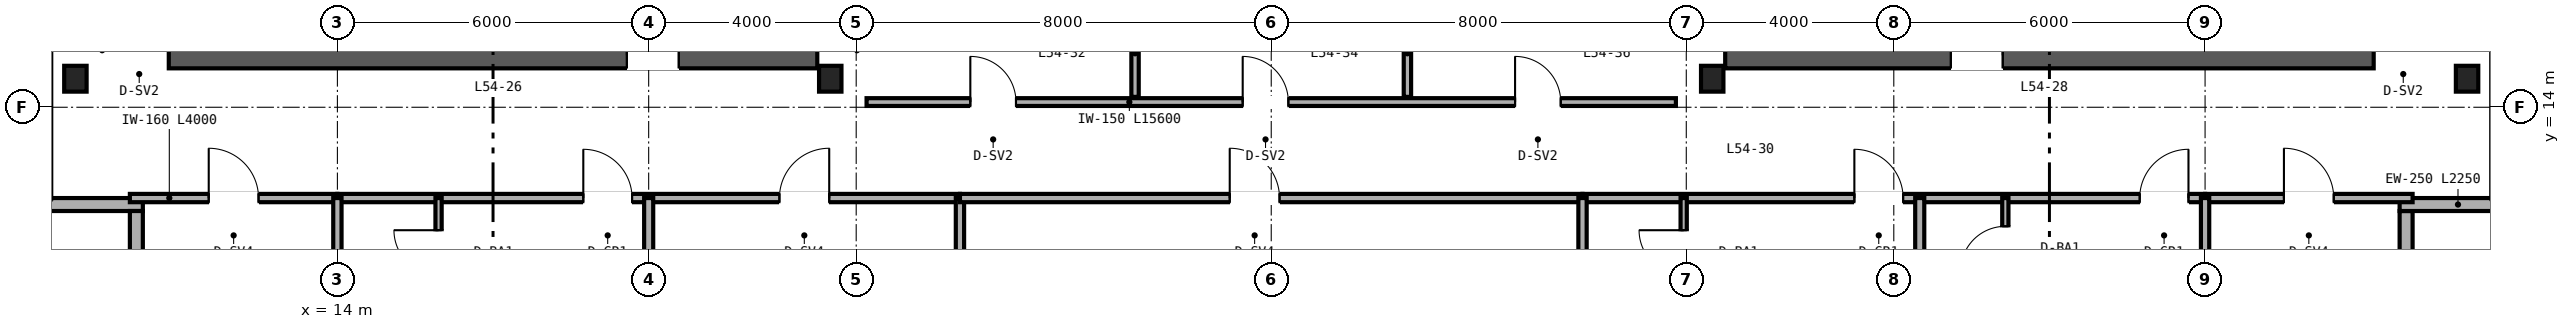
"""IFC4 building model, lengths in metres.
Left out: names, types, materials, properties, quantities, classifications, styles, units other than length and angle.
Written with IfcOpenShell. Run it as: python <this file> out.ifc"""

import sys

from ifc_helpers import new_model, si_unit, direction, frame, frame_2d, origin, origin_2d, place, context, subcontext, project, spatial, rectangle, i_section, extrude, source, transform, mapped, element, fill, save


model = new_model("IFC4")
c1 = context("Model", 3, precision=1e-05, world=origin(), true_north=direction((0.0, 1.0)))
c2 = subcontext(c1, "Body", "Model", "MODEL_VIEW")
j1 = project(units=[si_unit("LENGTHUNIT", "METRE"), si_unit("PLANEANGLEUNIT", "RADIAN")], contexts=[c1])
p1 = place(None, origin())
s1 = spatial("IfcSite", under=j1, at=p1, CompositionType="ELEMENT")
p2 = place(p1, origin())
s2 = spatial("IfcBuilding", under=s1, at=p2, CompositionType="ELEMENT")
p3 = place(p2, frame((0.0, 0.0, 213.6)))
s3 = spatial("IfcBuildingStorey", under=s2, at=p3, CompositionType="ELEMENT", Elevation=213.6)
p4 = place(p3, frame((10.75, 15.0, 0.0), z_axis=(0.0, 0.0, 1.0), x_axis=(1.0, 0.0, 0.0)))
e1 = element("IfcWall", 1, at=p4, inside=s3, PredefinedType="SHEAR", context=c2, shape_type="SweptSolid", body=[
    extrude(rectangle(XDim=12.5, YDim=0.5, at=frame_2d((6.25, 0.0))), origin(), (0.0, 0.0, 1.0), 3.37),
])
p5 = place(p4, frame((8.83, 0.0, 0.0)))
e2 = element("IfcOpeningElement", 2, at=p5, cuts=e1, PredefinedType="OPENING", context=c2, shape_type="SweptSolid", body=[
    extrude(rectangle(XDim=1.0, YDim=2.15, at=frame_2d((0.5, 1.075))), frame((0.0, 0.26, 0.0), z_axis=(0.0, -1.0, 0.0), x_axis=(1.0, 0.0, 0.0)), (0.0, 0.0, 1.0), 0.52),
])
p6 = place(p3, frame((40.75, 15.0, 0.0), z_axis=(0.0, 0.0, 1.0), x_axis=(1.0, 0.0, 0.0)))
e3 = element("IfcWall", 3, at=p6, inside=s3, PredefinedType="SHEAR", context=c2, shape_type="SweptSolid", body=[
    extrude(rectangle(XDim=12.5, YDim=0.5, at=frame_2d((6.25, 0.0))), origin(), (0.0, 0.0, 1.0), 3.37),
])
p7 = place(p6, frame((4.35, 0.0, 0.0)))
e4 = element("IfcOpeningElement", 4, at=p7, cuts=e3, PredefinedType="OPENING", context=c2, shape_type="SweptSolid", body=[
    extrude(rectangle(XDim=1.0, YDim=2.15, at=frame_2d((0.5, 1.075))), frame((0.0, 0.26, 0.0), z_axis=(0.0, -1.0, 0.0), x_axis=(1.0, 0.0, 0.0)), (0.0, 0.0, 1.0), 0.52),
])
m1 = source(origin(), c2, "Body", "SweptSolid", [
    extrude(i_section(OverallWidth=0.432, OverallDepth=0.498, WebThickness=0.056, FlangeThickness=0.089, FilletRadius=0.025, at=origin_2d()), origin(), (0.0, 0.0, 1.0), 3.37),
])
for number, where, z_axis, x_axis in (
    (5, (8.95, 14.55, 0.0), (0.0, 0.0, 1.0), (1.0, 0.0, 0.0)),
    (6, (23.5, 14.55, 0.0), (0.0, 0.0, 1.0), (1.0, 0.0, 0.0)),
    (7, (40.5, 14.55, 0.0), (0.0, 0.0, 1.0), (1.0, 0.0, 0.0)),
    (8, (55.05, 14.55, 0.0), (0.0, 0.0, 1.0), (1.0, 0.0, 0.0)),
):
    element("IfcColumn", number, at=place(p3, frame(where, z_axis=z_axis, x_axis=x_axis)), inside=s3, PredefinedType="COLUMN", context=c2, shape_type="MappedRepresentation", body=[
        mapped(m1, transform((0.0, 0.0, 0.0), scale=1.0)),
    ])
p8 = place(p3, frame((53.875, 10.0, 0.0), z_axis=(0.0, 0.0, 1.0), x_axis=(0.0, 1.0, 0.0)))
e9 = element("IfcWall", 9, at=p8, inside=s3, PredefinedType="SOLIDWALL", context=c2, shape_type="SweptSolid", body=[
    extrude(rectangle(XDim=2.0, YDim=0.25, at=frame_2d((1.0, 0.0))), origin(), (0.0, 0.0, 1.0), 3.37),
])
for number, where, z_axis, x_axis in (
    (10, (53.75, 12.125, 0.0), (0.0, 0.0, 1.0), (1.0, 0.0, 0.0)),
    (11, (8.0, 12.125, 0.0), (0.0, 0.0, 1.0), (1.0, 0.0, 0.0)),
):
    element("IfcWall", number, at=place(p3, frame(where, z_axis=z_axis, x_axis=x_axis)), inside=s3, PredefinedType="SOLIDWALL", context=c2, shape_type="SweptSolid", body=[
        extrude(rectangle(XDim=2.25, YDim=0.25, at=frame_2d((1.125, 0.0))), origin(), (0.0, 0.0, 1.0), 3.37),
    ])
p9 = place(p3, frame((10.125, 12.0, 0.0), z_axis=(0.0, 0.0, 1.0), x_axis=(0.0, -1.0, 0.0)))
e12 = element("IfcWall", 12, at=p9, inside=s3, PredefinedType="SOLIDWALL", context=c2, shape_type="SweptSolid", body=[
    extrude(rectangle(XDim=2.0, YDim=0.25, at=frame_2d((1.0, 0.0))), origin(), (0.0, 0.0, 1.0), 3.37),
])
p10 = place(p3, frame((24.2, 14.1, 0.0), z_axis=(0.0, 0.0, 1.0), x_axis=(1.0, 0.0, 0.0)))
e13 = element("IfcWall", 13, at=p10, inside=s3, PredefinedType="PARTITIONING", context=c2, shape_type="SweptSolid", body=[
    extrude(rectangle(XDim=15.6, YDim=0.15, at=frame_2d((7.8, 0.0))), origin(), (0.0, 0.0, 1.0), 3.37),
])
p11 = place(p10, frame((2.0, 0.0, 0.0)))
e14 = element("IfcOpeningElement", 14, at=p11, cuts=e13, PredefinedType="OPENING", context=c2, shape_type="SweptSolid", body=[
    extrude(rectangle(XDim=0.88, YDim=2.15, at=frame_2d((0.44, 1.075))), frame((0.0, 0.085, 0.0), z_axis=(0.0, -1.0, 0.0), x_axis=(1.0, 0.0, 0.0)), (0.0, 0.0, 1.0), 0.17),
])
p12 = place(p10, frame((7.25, 0.0, 0.0)))
e15 = element("IfcOpeningElement", 15, at=p12, cuts=e13, PredefinedType="OPENING", context=c2, shape_type="SweptSolid", body=[
    extrude(rectangle(XDim=0.88, YDim=2.15, at=frame_2d((0.44, 1.075))), frame((0.0, 0.085, 0.0), z_axis=(0.0, -1.0, 0.0), x_axis=(1.0, 0.0, 0.0)), (0.0, 0.0, 1.0), 0.17),
])
p13 = place(p10, frame((12.5, 0.0, 0.0)))
e16 = element("IfcOpeningElement", 16, at=p13, cuts=e13, PredefinedType="OPENING", context=c2, shape_type="SweptSolid", body=[
    extrude(rectangle(XDim=0.88, YDim=2.15, at=frame_2d((0.44, 1.075))), frame((0.0, 0.085, 0.0), z_axis=(0.0, -1.0, 0.0), x_axis=(1.0, 0.0, 0.0)), (0.0, 0.0, 1.0), 0.17),
])
for number, where, z_axis, x_axis in (
    (17, (29.375, 14.2, 0.0), (0.0, 0.0, 1.0), (0.0, 1.0, 0.0)),
    (18, (34.625, 14.2, 0.0), (0.0, 0.0, 1.0), (0.0, 1.0, 0.0)),
):
    element("IfcWall", number, at=place(p3, frame(where, z_axis=z_axis, x_axis=x_axis)), inside=s3, PredefinedType="PARTITIONING", context=c2, shape_type="SweptSolid", body=[
        extrude(rectangle(XDim=1.68, YDim=0.142, at=frame_2d((0.84, 0.0))), origin(), (0.0, 0.0, 1.0), 3.37),
    ])
p14 = place(p3, frame((10.0, 12.25, 0.0), z_axis=(0.0, 0.0, 1.0), x_axis=(1.0, 0.0, 0.0)))
e19 = element("IfcWall", 19, at=p14, inside=s3, PredefinedType="PARTITIONING", context=c2, shape_type="SweptSolid", body=[
    extrude(rectangle(XDim=4.0, YDim=0.16, at=frame_2d((2.0, 0.0))), origin(), (0.0, 0.0, 1.0), 3.37),
])
p15 = place(p14, frame((1.52, 0.0, 0.0)))
e20 = element("IfcOpeningElement", 20, at=p15, cuts=e19, PredefinedType="OPENING", context=c2, shape_type="SweptSolid", body=[
    extrude(rectangle(XDim=0.96, YDim=2.15, at=frame_2d((0.48, 1.075))), frame((0.0, 0.09, 0.0), z_axis=(0.0, -1.0, 0.0), x_axis=(1.0, 0.0, 0.0)), (0.0, 0.0, 1.0), 0.18),
])
p16 = place(p3, frame((50.0, 12.25, 0.0), z_axis=(0.0, 0.0, 1.0), x_axis=(1.0, 0.0, 0.0)))
e21 = element("IfcWall", 21, at=p16, inside=s3, PredefinedType="PARTITIONING", context=c2, shape_type="SweptSolid", body=[
    extrude(rectangle(XDim=4.0, YDim=0.16, at=frame_2d((2.0, 0.0))), origin(), (0.0, 0.0, 1.0), 3.37),
])
p17 = place(p16, frame((1.52, 0.0, 0.0)))
e22 = element("IfcOpeningElement", 22, at=p17, cuts=e21, PredefinedType="OPENING", context=c2, shape_type="SweptSolid", body=[
    extrude(rectangle(XDim=0.96, YDim=2.15, at=frame_2d((0.48, 1.075))), frame((0.0, 0.09, 0.0), z_axis=(0.0, -1.0, 0.0), x_axis=(1.0, 0.0, 0.0)), (0.0, 0.0, 1.0), 0.18),
])
p18 = place(p3, frame((14.0, 12.25, 0.0), z_axis=(0.0, 0.0, 1.0), x_axis=(1.0, 0.0, 0.0)))
e23 = element("IfcWall", 23, at=p18, inside=s3, PredefinedType="PARTITIONING", context=c2, shape_type="SweptSolid", body=[
    extrude(rectangle(XDim=12.0, YDim=0.16, at=frame_2d((6.0, 0.0))), origin(), (0.0, 0.0, 1.0), 2.913),
])
p19 = place(p18, frame((4.74, 0.0, 0.0)))
e24 = element("IfcOpeningElement", 24, at=p19, cuts=e23, PredefinedType="OPENING", context=c2, shape_type="SweptSolid", body=[
    extrude(rectangle(XDim=0.94, YDim=2.15, at=frame_2d((0.47, 1.075))), frame((0.0, 0.09, 0.0), z_axis=(0.0, -1.0, 0.0), x_axis=(1.0, 0.0, 0.0)), (0.0, 0.0, 1.0), 0.18),
])
p20 = place(p18, frame((8.52, 0.0, 0.0)))
e25 = element("IfcOpeningElement", 25, at=p20, cuts=e23, PredefinedType="OPENING", context=c2, shape_type="SweptSolid", body=[
    extrude(rectangle(XDim=0.96, YDim=2.15, at=frame_2d((0.48, 1.075))), frame((0.0, 0.09, 0.0), z_axis=(0.0, -1.0, 0.0), x_axis=(1.0, 0.0, 0.0)), (0.0, 0.0, 1.0), 0.18),
])
p21 = place(p3, frame((14.0, 6.36, 0.0), z_axis=(0.0, 0.0, 1.0), x_axis=(0.0, 1.0, 0.0)))
e26 = element("IfcWall", 26, at=p21, inside=s3, PredefinedType="PARTITIONING", context=c2, shape_type="SweptSolid", body=[
    extrude(rectangle(XDim=5.89, YDim=0.16, at=frame_2d((2.945, 0.0))), origin(), (0.0, 0.0, 1.0), 2.677),
])
p22 = place(p3, frame((26.0, 6.36, 0.0), z_axis=(0.0, 0.0, 1.0), x_axis=(0.0, 1.0, 0.0)))
e27 = element("IfcWall", 27, at=p22, inside=s3, PredefinedType="PARTITIONING", context=c2, shape_type="SweptSolid", body=[
    extrude(rectangle(XDim=5.89, YDim=0.16, at=frame_2d((2.945, 0.0))), origin(), (0.0, 0.0, 1.0), 2.443),
])
p23 = place(p3, frame((20.0, 6.36, 0.0), z_axis=(0.0, 0.0, 1.0), x_axis=(0.0, 1.0, 0.0)))
e28 = element("IfcWall", 28, at=p23, inside=s3, PredefinedType="PARTITIONING", context=c2, shape_type="SweptSolid", body=[
    extrude(rectangle(XDim=5.89, YDim=0.175, at=frame_2d((2.945, 0.0))), origin(), (0.0, 0.0, 1.0), 2.677),
])
p24 = place(p3, frame((15.95, 10.15, 0.0), z_axis=(0.0, 0.0, 1.0), x_axis=(0.0, 1.0, 0.0)))
e29 = element("IfcWall", 29, at=p24, inside=s3, PredefinedType="PARTITIONING", context=c2, shape_type="SweptSolid", body=[
    extrude(rectangle(XDim=2.1, YDim=0.12, at=frame_2d((1.05, 0.0))), origin(), (0.0, 0.0, 1.0), 3.37),
])
p25 = place(p24, frame((0.62, 0.0, 0.0)))
e30 = element("IfcOpeningElement", 30, at=p25, cuts=e29, PredefinedType="OPENING", context=c2, shape_type="SweptSolid", body=[
    extrude(rectangle(XDim=0.86, YDim=2.1, at=frame_2d((0.43, 1.05))), frame((0.0, 0.07, 0.0), z_axis=(0.0, -1.0, 0.0), x_axis=(1.0, 0.0, 0.0)), (0.0, 0.0, 1.0), 0.14),
])
p26 = place(p3, frame((26.0, 12.25, 0.0), z_axis=(0.0, 0.0, 1.0), x_axis=(1.0, 0.0, 0.0)))
e31 = element("IfcWall", 31, at=p26, inside=s3, PredefinedType="PARTITIONING", context=c2, shape_type="SweptSolid", body=[
    extrude(rectangle(XDim=12.0, YDim=0.16, at=frame_2d((6.0, 0.0))), origin(), (0.0, 0.0, 1.0), 3.37),
])
p27 = place(p26, frame((5.2, 0.0, 0.0)))
e32 = element("IfcOpeningElement", 32, at=p27, cuts=e31, PredefinedType="OPENING", context=c2, shape_type="SweptSolid", body=[
    extrude(rectangle(XDim=0.96, YDim=2.15, at=frame_2d((0.48, 1.075))), frame((0.0, 0.09, 0.0), z_axis=(0.0, -1.0, 0.0), x_axis=(1.0, 0.0, 0.0)), (0.0, 0.0, 1.0), 0.18),
])
p28 = place(p3, frame((38.0, 12.25, 0.0), z_axis=(0.0, 0.0, 1.0), x_axis=(1.0, 0.0, 0.0)))
e33 = element("IfcWall", 33, at=p28, inside=s3, PredefinedType="PARTITIONING", context=c2, shape_type="SweptSolid", body=[
    extrude(rectangle(XDim=12.0, YDim=0.16, at=frame_2d((6.0, 0.0))), origin(), (0.0, 0.0, 1.0), 2.913),
])
p29 = place(p28, frame((5.24, 0.0, 0.0)))
e34 = element("IfcOpeningElement", 34, at=p29, cuts=e33, PredefinedType="OPENING", context=c2, shape_type="SweptSolid", body=[
    extrude(rectangle(XDim=0.94, YDim=2.15, at=frame_2d((0.47, 1.075))), frame((0.0, 0.09, 0.0), z_axis=(0.0, -1.0, 0.0), x_axis=(1.0, 0.0, 0.0)), (0.0, 0.0, 1.0), 0.18),
])
p30 = place(p28, frame((10.74, 0.0, 0.0)))
e35 = element("IfcOpeningElement", 35, at=p30, cuts=e33, PredefinedType="OPENING", context=c2, shape_type="SweptSolid", body=[
    extrude(rectangle(XDim=0.94, YDim=2.15, at=frame_2d((0.47, 1.075))), frame((0.0, 0.09, 0.0), z_axis=(0.0, -1.0, 0.0), x_axis=(1.0, 0.0, 0.0)), (0.0, 0.0, 1.0), 0.18),
])
p31 = place(p3, frame((38.0, 6.36, 0.0), z_axis=(0.0, 0.0, 1.0), x_axis=(0.0, 1.0, 0.0)))
e36 = element("IfcWall", 36, at=p31, inside=s3, PredefinedType="PARTITIONING", context=c2, shape_type="SweptSolid", body=[
    extrude(rectangle(XDim=5.89, YDim=0.16, at=frame_2d((2.945, 0.0))), origin(), (0.0, 0.0, 1.0), 2.443),
])
p32 = place(p3, frame((50.0, 6.36, 0.0), z_axis=(0.0, 0.0, 1.0), x_axis=(0.0, 1.0, 0.0)))
e37 = element("IfcWall", 37, at=p32, inside=s3, PredefinedType="PARTITIONING", context=c2, shape_type="SweptSolid", body=[
    extrude(rectangle(XDim=5.89, YDim=0.16, at=frame_2d((2.945, 0.0))), origin(), (0.0, 0.0, 1.0), 2.677),
])
p33 = place(p3, frame((44.5, 6.36, 0.0), z_axis=(0.0, 0.0, 1.0), x_axis=(0.0, 1.0, 0.0)))
e38 = element("IfcWall", 38, at=p33, inside=s3, PredefinedType="PARTITIONING", context=c2, shape_type="SweptSolid", body=[
    extrude(rectangle(XDim=5.89, YDim=0.175, at=frame_2d((2.945, 0.0))), origin(), (0.0, 0.0, 1.0), 2.677),
])
p34 = place(p3, frame((39.95, 10.15, 0.0), z_axis=(0.0, 0.0, 1.0), x_axis=(0.0, 1.0, 0.0)))
e39 = element("IfcWall", 39, at=p34, inside=s3, PredefinedType="PARTITIONING", context=c2, shape_type="SweptSolid", body=[
    extrude(rectangle(XDim=2.1, YDim=0.12, at=frame_2d((1.05, 0.0))), origin(), (0.0, 0.0, 1.0), 3.37),
])
p35 = place(p34, frame((0.62, 0.0, 0.0)))
e40 = element("IfcOpeningElement", 40, at=p35, cuts=e39, PredefinedType="OPENING", context=c2, shape_type="SweptSolid", body=[
    extrude(rectangle(XDim=0.86, YDim=2.1, at=frame_2d((0.43, 1.05))), frame((0.0, 0.07, 0.0), z_axis=(0.0, -1.0, 0.0), x_axis=(1.0, 0.0, 0.0)), (0.0, 0.0, 1.0), 0.14),
])
p36 = place(p3, frame((46.15, 10.3, 0.0), z_axis=(0.0, 0.0, 1.0), x_axis=(0.0, 1.0, 0.0)))
e41 = element("IfcWall", 41, at=p36, inside=s3, PredefinedType="PARTITIONING", context=c2, shape_type="SweptSolid", body=[
    extrude(rectangle(XDim=1.95, YDim=0.12, at=frame_2d((0.975, 0.0))), origin(), (0.0, 0.0, 1.0), 3.37),
])
p37 = place(p36, frame((0.545, 0.0, 0.0)))
e42 = element("IfcOpeningElement", 42, at=p37, cuts=e41, PredefinedType="OPENING", context=c2, shape_type="SweptSolid", body=[
    extrude(rectangle(XDim=0.86, YDim=2.1, at=frame_2d((0.43, 1.05))), frame((0.0, 0.07, 0.0), z_axis=(0.0, -1.0, 0.0), x_axis=(1.0, 0.0, 0.0)), (0.0, 0.0, 1.0), 0.14),
])
m2 = source(origin(), c2, "Body", "SweptSolid", [
    extrude(rectangle(XDim=1.0, YDim=2.15, at=frame_2d((0.5, 1.075))), frame((0.0, 0.025, 0.0), z_axis=(0.0, -1.0, 0.0), x_axis=(1.0, 0.0, 0.0)), (0.0, 0.0, 1.0), 0.05),
])
p38 = place(p5, origin())
e43 = element("IfcDoor", 43, at=p38, inside=s3, OperationType="SINGLE_SWING_LEFT", PredefinedType="DOOR", context=c2, shape_type="MappedRepresentation", body=[
    mapped(m2, transform((0.0, 0.0, 0.0), scale=1.0)),
])
fill(e2, e43)
p39 = place(p7, origin())
e44 = element("IfcDoor", 44, at=p39, inside=s3, OperationType="SINGLE_SWING_RIGHT", PredefinedType="DOOR", context=c2, shape_type="MappedRepresentation", body=[
    mapped(m2, transform((0.0, 0.0, 0.0), scale=1.0)),
])
fill(e4, e44)
m3 = source(origin(), c2, "Body", "SweptSolid", [
    extrude(rectangle(XDim=0.88, YDim=2.15, at=frame_2d((0.44, 1.075))), frame((0.0, 0.025, 0.0), z_axis=(0.0, -1.0, 0.0), x_axis=(1.0, 0.0, 0.0)), (0.0, 0.0, 1.0), 0.05),
])
p40 = place(p11, origin())
e45 = element("IfcDoor", 45, at=p40, inside=s3, OperationType="SINGLE_SWING_LEFT", PredefinedType="DOOR", context=c2, shape_type="MappedRepresentation", body=[
    mapped(m3, transform((0.0, 0.0, 0.0), scale=1.0)),
])
fill(e14, e45)
p41 = place(p12, origin())
e46 = element("IfcDoor", 46, at=p41, inside=s3, OperationType="SINGLE_SWING_LEFT", PredefinedType="DOOR", context=c2, shape_type="MappedRepresentation", body=[
    mapped(m3, transform((0.0, 0.0, 0.0), scale=1.0)),
])
fill(e15, e46)
p42 = place(p13, origin())
e47 = element("IfcDoor", 47, at=p42, inside=s3, OperationType="SINGLE_SWING_LEFT", PredefinedType="DOOR", context=c2, shape_type="MappedRepresentation", body=[
    mapped(m3, transform((0.0, 0.0, 0.0), scale=1.0)),
])
fill(e16, e47)
m4 = source(origin(), c2, "Body", "SweptSolid", [
    extrude(rectangle(XDim=0.96, YDim=2.15, at=frame_2d((0.48, 1.075))), frame((0.0, 0.025, 0.0), z_axis=(0.0, -1.0, 0.0), x_axis=(1.0, 0.0, 0.0)), (0.0, 0.0, 1.0), 0.05),
])
p43 = place(p15, origin())
e48 = element("IfcDoor", 48, at=p43, inside=s3, OperationType="SINGLE_SWING_LEFT", PredefinedType="DOOR", context=c2, shape_type="MappedRepresentation", body=[
    mapped(m4, transform((0.0, 0.0, 0.0), scale=1.0)),
])
fill(e20, e48)
p44 = place(p17, origin())
e49 = element("IfcDoor", 49, at=p44, inside=s3, OperationType="SINGLE_SWING_LEFT", PredefinedType="DOOR", context=c2, shape_type="MappedRepresentation", body=[
    mapped(m4, transform((0.0, 0.0, 0.0), scale=1.0)),
])
fill(e22, e49)
m5 = source(origin(), c2, "Body", "SweptSolid", [
    extrude(rectangle(XDim=0.86, YDim=2.1, at=frame_2d((0.43, 1.05))), frame((0.0, 0.025, 0.0), z_axis=(0.0, -1.0, 0.0), x_axis=(1.0, 0.0, 0.0)), (0.0, 0.0, 1.0), 0.05),
])
p45 = place(p25, origin())
e50 = element("IfcDoor", 50, at=p45, inside=s3, OperationType="SINGLE_SWING_RIGHT", PredefinedType="DOOR", context=c2, shape_type="MappedRepresentation", body=[
    mapped(m5, transform((0.0, 0.0, 0.0), scale=1.0)),
])
fill(e30, e50)
m6 = source(origin(), c2, "Body", "SweptSolid", [
    extrude(rectangle(XDim=0.94, YDim=2.15, at=frame_2d((0.47, 1.075))), frame((0.0, 0.025, 0.0), z_axis=(0.0, -1.0, 0.0), x_axis=(1.0, 0.0, 0.0)), (0.0, 0.0, 1.0), 0.05),
])
p46 = place(p19, origin())
e51 = element("IfcDoor", 51, at=p46, inside=s3, OperationType="SINGLE_SWING_LEFT", PredefinedType="DOOR", context=c2, shape_type="MappedRepresentation", body=[
    mapped(m6, transform((0.0, 0.0, 0.0), scale=1.0)),
])
fill(e24, e51)
p47 = place(p20, origin())
e52 = element("IfcDoor", 52, at=p47, inside=s3, OperationType="SINGLE_SWING_RIGHT", PredefinedType="DOOR", context=c2, shape_type="MappedRepresentation", body=[
    mapped(m4, transform((0.0, 0.0, 0.0), scale=1.0)),
])
fill(e25, e52)
p48 = place(p27, origin())
e53 = element("IfcDoor", 53, at=p48, inside=s3, OperationType="SINGLE_SWING_LEFT", PredefinedType="DOOR", context=c2, shape_type="MappedRepresentation", body=[
    mapped(m4, transform((0.0, 0.0, 0.0), scale=1.0)),
])
fill(e32, e53)
p49 = place(p35, origin())
e54 = element("IfcDoor", 54, at=p49, inside=s3, OperationType="SINGLE_SWING_RIGHT", PredefinedType="DOOR", context=c2, shape_type="MappedRepresentation", body=[
    mapped(m5, transform((0.0, 0.0, 0.0), scale=1.0)),
])
fill(e40, e54)
p50 = place(p37, origin())
e55 = element("IfcDoor", 55, at=p50, inside=s3, OperationType="SINGLE_SWING_LEFT", PredefinedType="DOOR", context=c2, shape_type="MappedRepresentation", body=[
    mapped(m5, transform((0.0, 0.0, 0.0), scale=1.0)),
])
fill(e42, e55)
p51 = place(p29, origin())
e56 = element("IfcDoor", 56, at=p51, inside=s3, OperationType="SINGLE_SWING_LEFT", PredefinedType="DOOR", context=c2, shape_type="MappedRepresentation", body=[
    mapped(m6, transform((0.0, 0.0, 0.0), scale=1.0)),
])
fill(e34, e56)
p52 = place(p30, origin())
e57 = element("IfcDoor", 57, at=p52, inside=s3, OperationType="SINGLE_SWING_RIGHT", PredefinedType="DOOR", context=c2, shape_type="MappedRepresentation", body=[
    mapped(m6, transform((0.0, 0.0, 0.0), scale=1.0)),
])
fill(e35, e57)
save(model, sys.argv[1])
